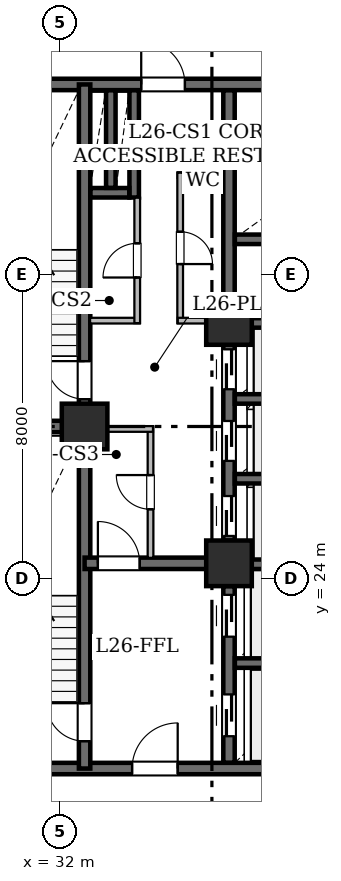
"""IFC4 building model, lengths in metres.
Left out: names, types, materials, properties, quantities, classifications, styles, units other than length and angle.
Written with IfcOpenShell. Run it as: python <this file> out.ifc"""

import sys

from ifc_helpers import new_model, si_unit, direction, frame, frame_2d, origin, origin_2d, place, context, subcontext, project, spatial, rectangle, hollow_rectangle, extrude, element, fill, save


model = new_model("IFC4")
c1 = context("Model", 3, precision=1e-05, world=origin(), true_north=direction((0.0, 1.0)))
c2 = subcontext(c1, "Body", "Model", "MODEL_VIEW")
j1 = project(units=[si_unit("LENGTHUNIT", "METRE"), si_unit("PLANEANGLEUNIT", "RADIAN")], contexts=[c1])
p1 = place(None, origin())
s1 = spatial("IfcSite", under=j1, at=p1, CompositionType="ELEMENT")
p2 = place(p1, origin())
s2 = spatial("IfcBuilding", under=s1, at=p2, CompositionType="ELEMENT")
p3 = place(p2, frame((0.0, 0.0, 105.55)))
s3 = spatial("IfcBuildingStorey", under=s2, at=p3, CompositionType="ELEMENT", Elevation=105.55)
for number, where, z_axis, x_axis in (
    (1, (32.65, 28.0, 0.0), (0.0, 0.0, 1.0), (1.0, 0.0, 0.0)),
    (2, (36.45, 24.4, 0.0), (0.0, 0.0, 1.0), (1.0, 0.0, 0.0)),
    (3, (36.45, 30.75, 0.0), (0.0, 0.0, 1.0), (1.0, 0.0, 0.0)),
):
    element("IfcColumn", number, at=place(p3, frame(where, z_axis=z_axis, x_axis=x_axis)), inside=s3, PredefinedType="COLUMN", context=c2, shape_type="SweptSolid", body=[
        extrude(hollow_rectangle(XDim=1.2, YDim=1.2, WallThickness=0.06, at=origin_2d()), origin(), (0.0, 0.0, 1.0), 3.65),
    ])
p4 = place(p3, frame((29.0, 19.0, 0.0), z_axis=(0.0, 0.0, 1.0), x_axis=(1.0, 0.0, 0.0)))
e4 = element("IfcWall", 4, at=p4, inside=s3, PredefinedType="SHEAR", context=c2, shape_type="SweptSolid", body=[
    extrude(rectangle(XDim=10.4, YDim=0.3, at=frame_2d((5.2, 0.0))), origin(), (0.0, 0.0, 1.0), 3.43),
])
p5 = place(p4, frame((4.9, 0.0, 0.0)))
e5 = element("IfcOpeningElement", 5, at=p5, cuts=e4, PredefinedType="OPENING", context=c2, shape_type="SweptSolid", body=[
    extrude(rectangle(XDim=1.2, YDim=2.15, at=frame_2d((0.6, 1.075))), frame((0.0, 0.16, 0.0), z_axis=(0.0, -1.0, 0.0), x_axis=(1.0, 0.0, 0.0)), (0.0, 0.0, 1.0), 0.32),
])
p6 = place(p3, frame((29.0, 37.0, 0.0), z_axis=(0.0, 0.0, 1.0), x_axis=(1.0, 0.0, 0.0)))
e6 = element("IfcWall", 6, at=p6, inside=s3, PredefinedType="SHEAR", context=c2, shape_type="SweptSolid", body=[
    extrude(rectangle(XDim=10.4, YDim=0.3, at=frame_2d((5.2, 0.0))), origin(), (0.0, 0.0, 1.0), 3.43),
])
p7 = place(p6, frame((5.14, 0.0, 0.0)))
e7 = element("IfcOpeningElement", 7, at=p7, cuts=e6, PredefinedType="OPENING", context=c2, shape_type="SweptSolid", body=[
    extrude(rectangle(XDim=1.15, YDim=2.2, at=frame_2d((0.575, 1.1))), frame((0.0, 0.16, 0.0), z_axis=(0.0, -1.0, 0.0), x_axis=(1.0, 0.0, 0.0)), (0.0, 0.0, 1.0), 0.32),
])
p8 = place(p3, frame((32.65, 19.0, 0.0), z_axis=(0.0, 0.0, 1.0), x_axis=(0.0, 1.0, 0.0)))
e8 = element("IfcWall", 8, at=p8, inside=s3, PredefinedType="SHEAR", context=c2, shape_type="SweptSolid", body=[
    extrude(rectangle(XDim=9.0, YDim=0.3, at=frame_2d((4.5, 0.0))), origin(), (0.0, 0.0, 1.0), 3.43),
])
p9 = place(p8, frame((0.72, 0.0, 0.0)))
e9 = element("IfcOpeningElement", 9, at=p9, cuts=e8, PredefinedType="OPENING", context=c2, shape_type="SweptSolid", body=[
    extrude(rectangle(XDim=1.0, YDim=2.15, at=frame_2d((0.5, 1.075))), frame((0.0, 0.16, 0.0), z_axis=(0.0, -1.0, 0.0), x_axis=(1.0, 0.0, 0.0)), (0.0, 0.0, 1.0), 0.32),
])
p10 = place(p3, frame((32.65, 28.0, 0.0), z_axis=(0.0, 0.0, 1.0), x_axis=(0.0, 1.0, 0.0)))
e10 = element("IfcWall", 10, at=p10, inside=s3, PredefinedType="SHEAR", context=c2, shape_type="SweptSolid", body=[
    extrude(rectangle(XDim=9.0, YDim=0.3, at=frame_2d((4.5, 0.0))), origin(), (0.0, 0.0, 1.0), 3.43),
])
p11 = place(p10, frame((0.72, 0.0, 0.0)))
e11 = element("IfcOpeningElement", 11, at=p11, cuts=e10, PredefinedType="OPENING", context=c2, shape_type="SweptSolid", body=[
    extrude(rectangle(XDim=1.0, YDim=2.15, at=frame_2d((0.5, 1.075))), frame((0.0, 0.16, 0.0), z_axis=(0.0, -1.0, 0.0), x_axis=(1.0, 0.0, 0.0)), (0.0, 0.0, 1.0), 0.32),
])
p12 = place(p3, frame((29.0, 28.0, 0.0), z_axis=(0.0, 0.0, 1.0), x_axis=(1.0, 0.0, 0.0)))
e12 = element("IfcWall", 12, at=p12, inside=s3, PredefinedType="SHEAR", context=c2, shape_type="SweptSolid", body=[
    extrude(rectangle(XDim=3.65, YDim=0.3, at=frame_2d((1.825, 0.0))), origin(), (0.0, 0.0, 1.0), 3.43),
])
p13 = place(p3, frame((32.65, 24.4, 0.0), z_axis=(0.0, 0.0, 1.0), x_axis=(1.0, 0.0, 0.0)))
e13 = element("IfcWall", 13, at=p13, inside=s3, PredefinedType="SHEAR", context=c2, shape_type="SweptSolid", body=[
    extrude(rectangle(XDim=3.8, YDim=0.3, at=frame_2d((1.9, 0.0))), origin(), (0.0, 0.0, 1.0), 3.43),
])
p14 = place(p13, frame((0.35, 0.0, 0.0)))
e14 = element("IfcOpeningElement", 14, at=p14, cuts=e13, PredefinedType="OPENING", context=c2, shape_type="SweptSolid", body=[
    extrude(rectangle(XDim=1.1, YDim=2.15, at=frame_2d((0.55, 1.075))), frame((0.0, 0.16, 0.0), z_axis=(0.0, -1.0, 0.0), x_axis=(1.0, 0.0, 0.0)), (0.0, 0.0, 1.0), 0.32),
])
p15 = place(p3, frame((36.45, 19.154, 0.0), z_axis=(0.0, 0.0, 1.0), x_axis=(0.0, 1.0, 0.0)))
e15 = element("IfcWall", 15, at=p15, inside=s3, PredefinedType="SHEAR", context=c2, shape_type="SweptSolid", body=[
    extrude(rectangle(XDim=4.646, YDim=0.3, at=frame_2d((2.323, 0.0))), origin(), (0.0, 0.0, 1.0), 3.43),
])
p16 = place(p15, frame((0.696, 0.0, 0.0)))
e16 = element("IfcOpeningElement", 16, at=p16, cuts=e15, PredefinedType="OPENING", context=c2, shape_type="SweptSolid", body=[
    extrude(rectangle(XDim=1.1, YDim=2.15, at=frame_2d((0.55, 1.075))), frame((0.0, 0.16, 0.0), z_axis=(0.0, -1.0, 0.0), x_axis=(1.0, 0.0, 0.0)), (0.0, 0.0, 1.0), 0.32),
])
p17 = place(p15, frame((3.316, 0.0, 0.0)))
e17 = element("IfcOpeningElement", 17, at=p17, cuts=e15, PredefinedType="OPENING", context=c2, shape_type="SweptSolid", body=[
    extrude(rectangle(XDim=1.1, YDim=2.15, at=frame_2d((0.55, 1.075))), frame((0.0, 0.16, 0.0), z_axis=(0.0, -1.0, 0.0), x_axis=(1.0, 0.0, 0.0)), (0.0, 0.0, 1.0), 0.32),
])
p18 = place(p3, frame((36.45, 25.0, 0.0), z_axis=(0.0, 0.0, 1.0), x_axis=(0.0, 1.0, 0.0)))
e18 = element("IfcWall", 18, at=p18, inside=s3, PredefinedType="SHEAR", context=c2, shape_type="SweptSolid", body=[
    extrude(rectangle(XDim=5.15, YDim=0.3, at=frame_2d((2.575, 0.0))), origin(), (0.0, 0.0, 1.0), 3.43),
])
p19 = place(p18, frame((0.12, 0.0, 0.0)))
e19 = element("IfcOpeningElement", 19, at=p19, cuts=e18, PredefinedType="OPENING", context=c2, shape_type="SweptSolid", body=[
    extrude(rectangle(XDim=1.05, YDim=2.15, at=frame_2d((0.525, 1.075))), frame((0.0, 0.16, 0.0), z_axis=(0.0, -1.0, 0.0), x_axis=(1.0, 0.0, 0.0)), (0.0, 0.0, 1.0), 0.32),
])
p20 = place(p18, frame((2.095, 0.0, 0.0)))
e20 = element("IfcOpeningElement", 20, at=p20, cuts=e18, PredefinedType="OPENING", context=c2, shape_type="SweptSolid", body=[
    extrude(rectangle(XDim=1.05, YDim=2.15, at=frame_2d((0.525, 1.075))), frame((0.0, 0.16, 0.0), z_axis=(0.0, -1.0, 0.0), x_axis=(1.0, 0.0, 0.0)), (0.0, 0.0, 1.0), 0.32),
])
p21 = place(p18, frame((3.98, 0.0, 0.0)))
e21 = element("IfcOpeningElement", 21, at=p21, cuts=e18, PredefinedType="OPENING", context=c2, shape_type="SweptSolid", body=[
    extrude(rectangle(XDim=1.05, YDim=2.15, at=frame_2d((0.525, 1.075))), frame((0.0, 0.16, 0.0), z_axis=(0.0, -1.0, 0.0), x_axis=(1.0, 0.0, 0.0)), (0.0, 0.0, 1.0), 0.32),
])
p22 = place(p3, frame((36.45, 31.35, 0.0), z_axis=(0.0, 0.0, 1.0), x_axis=(0.0, 1.0, 0.0)))
e22 = element("IfcWall", 22, at=p22, inside=s3, PredefinedType="SHEAR", context=c2, shape_type="SweptSolid", body=[
    extrude(rectangle(XDim=5.496, YDim=0.3, at=frame_2d((2.748, 0.0))), origin(), (0.0, 0.0, 1.0), 3.43),
])
for number, where, z_axis, x_axis in (
    (23, (36.604, 21.775, 0.0), (0.0, 0.0, 1.0), (1.0, 0.0, 0.0)),
    (24, (36.604, 24.375, 0.0), (0.0, 0.0, 1.0), (1.0, 0.0, 0.0)),
    (25, (36.604, 26.625, 0.0), (0.0, 0.0, 1.0), (1.0, 0.0, 0.0)),
    (26, (36.604, 28.725, 0.0), (0.0, 0.0, 1.0), (1.0, 0.0, 0.0)),
    (27, (36.604, 30.725, 0.0), (0.0, 0.0, 1.0), (1.0, 0.0, 0.0)),
    (28, (36.604, 32.925, 0.0), (0.0, 0.0, 1.0), (1.0, 0.0, 0.0)),
    (29, (36.604, 34.975, 0.0), (0.0, 0.0, 1.0), (1.0, 0.0, 0.0)),
):
    element("IfcWall", number, at=place(p3, frame(where, z_axis=z_axis, x_axis=x_axis)), inside=s3, PredefinedType="SHEAR", context=c2, shape_type="SweptSolid", body=[
        extrude(rectangle(XDim=2.642, YDim=0.25, at=frame_2d((1.321, 0.0))), origin(), (0.0, 0.0, 1.0), 3.43),
    ])
p23 = place(p3, frame((33.955, 34.025, 0.0), z_axis=(0.0, 0.0, 1.0), x_axis=(0.0, 1.0, 0.0)))
e30 = element("IfcWall", 30, at=p23, inside=s3, PredefinedType="SHEAR", context=c2, shape_type="SweptSolid", body=[
    extrude(rectangle(XDim=2.821, YDim=0.25, at=frame_2d((1.411, 0.0))), origin(), (0.0, 0.0, 1.0), 3.43),
])
p24 = place(p3, frame((32.804, 34.15, 0.0), z_axis=(0.0, 0.0, 1.0), x_axis=(1.0, 0.0, 0.0)))
e31 = element("IfcWall", 31, at=p24, inside=s3, PredefinedType="SHEAR", context=c2, shape_type="SweptSolid", body=[
    extrude(rectangle(XDim=1.022, YDim=0.25, at=frame_2d((0.511, 0.0))), origin(), (0.0, 0.0, 1.0), 3.43),
])
p25 = place(p3, frame((33.34, 34.279, 0.0), z_axis=(0.0, 0.0, 1.0), x_axis=(0.0, 1.0, 0.0)))
e32 = element("IfcWall", 32, at=p25, inside=s3, PredefinedType="SHEAR", context=c2, shape_type="SweptSolid", body=[
    extrude(rectangle(XDim=2.567, YDim=0.25, at=frame_2d((1.283, 0.0))), origin(), (0.0, 0.0, 1.0), 3.43),
])
p26 = place(p3, frame((36.306, 34.615, 0.0), z_axis=(0.0, 0.0, 1.0), x_axis=(-1.0, 0.0, 0.0)))
e33 = element("IfcWall", 33, at=p26, inside=s3, PredefinedType="STANDARD", context=c2, shape_type="SweptSolid", body=[
    extrude(rectangle(XDim=1.206, YDim=0.15, at=frame_2d((0.603, 0.0))), origin(), (0.0, 0.0, 1.0), 3.43),
])
p27 = place(p3, frame((35.165, 34.678, 0.0), z_axis=(0.0, 0.0, 1.0), x_axis=(0.0, -1.0, 0.0)))
e34 = element("IfcWall", 34, at=p27, inside=s3, PredefinedType="STANDARD", context=c2, shape_type="SweptSolid", body=[
    extrude(rectangle(XDim=3.958, YDim=0.15, at=frame_2d((1.979, 0.0))), origin(), (0.0, 0.0, 1.0), 3.43),
])
p28 = place(p27, frame((1.554, 0.0, 0.0)))
e35 = element("IfcOpeningElement", 35, at=p28, cuts=e34, PredefinedType="OPENING", context=c2, shape_type="SweptSolid", body=[
    extrude(rectangle(XDim=0.85, YDim=2.1, at=frame_2d((0.425, 1.05))), frame((0.0, 0.085, 0.0), z_axis=(0.0, -1.0, 0.0), x_axis=(1.0, 0.0, 0.0)), (0.0, 0.0, 1.0), 0.17),
])
p29 = place(p3, frame((35.102, 30.785, 0.0), z_axis=(0.0, 0.0, 1.0), x_axis=(1.0, 0.0, 0.0)))
e36 = element("IfcWall", 36, at=p29, inside=s3, PredefinedType="STANDARD", context=c2, shape_type="SweptSolid", body=[
    extrude(rectangle(XDim=1.198, YDim=0.15, at=frame_2d((0.599, 0.0))), origin(), (0.0, 0.0, 1.0), 3.43),
])
p30 = place(p3, frame((32.794, 30.785, 0.0), z_axis=(0.0, 0.0, 1.0), x_axis=(1.0, 0.0, 0.0)))
e37 = element("IfcWall", 37, at=p30, inside=s3, PredefinedType="STANDARD", context=c2, shape_type="SweptSolid", body=[
    extrude(rectangle(XDim=1.306, YDim=0.15, at=frame_2d((0.653, 0.0))), origin(), (0.0, 0.0, 1.0), 2.887),
])
p31 = place(p3, frame((34.035, 30.72, 0.0), z_axis=(0.0, 0.0, 1.0), x_axis=(0.0, 1.0, 0.0)))
e38 = element("IfcWall", 38, at=p31, inside=s3, PredefinedType="STANDARD", context=c2, shape_type="SweptSolid", body=[
    extrude(rectangle(XDim=3.3, YDim=0.15, at=frame_2d((1.65, 0.0))), origin(), (0.0, 0.0, 1.0), 3.43),
])
p32 = place(p31, frame((1.2, 0.0, 0.0)))
e39 = element("IfcOpeningElement", 39, at=p32, cuts=e38, PredefinedType="OPENING", context=c2, shape_type="SweptSolid", body=[
    extrude(rectangle(XDim=0.9, YDim=2.1, at=frame_2d((0.45, 1.05))), frame((0.0, 0.085, 0.0), z_axis=(0.0, -1.0, 0.0), x_axis=(1.0, 0.0, 0.0)), (0.0, 0.0, 1.0), 0.17),
])
p33 = place(p3, frame((34.385, 24.544, 0.0), z_axis=(0.0, 0.0, 1.0), x_axis=(0.0, 1.0, 0.0)))
e40 = element("IfcWall", 40, at=p33, inside=s3, PredefinedType="STANDARD", context=c2, shape_type="SweptSolid", body=[
    extrude(rectangle(XDim=3.456, YDim=0.15, at=frame_2d((1.728, 0.0))), origin(), (0.0, 0.0, 1.0), 3.43),
])
p34 = place(p33, frame((1.278, 0.0, 0.0)))
e41 = element("IfcOpeningElement", 41, at=p34, cuts=e40, PredefinedType="OPENING", context=c2, shape_type="SweptSolid", body=[
    extrude(rectangle(XDim=0.9, YDim=2.1, at=frame_2d((0.45, 1.05))), frame((0.0, 0.085, 0.0), z_axis=(0.0, -1.0, 0.0), x_axis=(1.0, 0.0, 0.0)), (0.0, 0.0, 1.0), 0.17),
])
p35 = place(p3, frame((34.45, 27.935, 0.0), z_axis=(0.0, 0.0, 1.0), x_axis=(-1.0, 0.0, 0.0)))
e42 = element("IfcWall", 42, at=p35, inside=s3, PredefinedType="STANDARD", context=c2, shape_type="SweptSolid", body=[
    extrude(rectangle(XDim=1.656, YDim=0.15, at=frame_2d((0.828, 0.0))), origin(), (0.0, 0.0, 1.0), 2.887),
])
p36 = place(p9, origin())
e43 = element("IfcDoor", 43, at=p36, inside=s3, OperationType="SINGLE_SWING_RIGHT", PredefinedType="DOOR", context=c2, shape_type="SweptSolid", body=[
    extrude(rectangle(XDim=1.0, YDim=2.15, at=frame_2d((0.5, 1.075))), frame((0.0, 0.025, 0.0), z_axis=(0.0, -1.0, 0.0), x_axis=(1.0, 0.0, 0.0)), (0.0, 0.0, 1.0), 0.05),
])
fill(e9, e43)
p37 = place(p11, origin())
e44 = element("IfcDoor", 44, at=p37, inside=s3, OperationType="SINGLE_SWING_RIGHT", PredefinedType="DOOR", context=c2, shape_type="SweptSolid", body=[
    extrude(rectangle(XDim=1.0, YDim=2.15, at=frame_2d((0.5, 1.075))), frame((0.0, 0.025, 0.0), z_axis=(0.0, -1.0, 0.0), x_axis=(1.0, 0.0, 0.0)), (0.0, 0.0, 1.0), 0.05),
])
fill(e11, e44)
p38 = place(p14, origin())
e45 = element("IfcDoor", 45, at=p38, inside=s3, OperationType="SINGLE_SWING_LEFT", PredefinedType="DOOR", context=c2, shape_type="SweptSolid", body=[
    extrude(rectangle(XDim=1.1, YDim=2.15, at=frame_2d((0.55, 1.075))), frame((0.0, 0.025, 0.0), z_axis=(0.0, -1.0, 0.0), x_axis=(1.0, 0.0, 0.0)), (0.0, 0.0, 1.0), 0.05),
])
fill(e14, e45)
p39 = place(p5, origin())
e46 = element("IfcDoor", 46, at=p39, inside=s3, OperationType="SINGLE_SWING_RIGHT", PredefinedType="DOOR", context=c2, shape_type="SweptSolid", body=[
    extrude(rectangle(XDim=1.2, YDim=2.15, at=frame_2d((0.6, 1.075))), frame((0.0, 0.025, 0.0), z_axis=(0.0, -1.0, 0.0), x_axis=(1.0, 0.0, 0.0)), (0.0, 0.0, 1.0), 0.05),
])
fill(e5, e46)
p40 = place(p7, origin())
e47 = element("IfcDoor", 47, at=p40, inside=s3, OperationType="SINGLE_SWING_LEFT", PredefinedType="DOOR", context=c2, shape_type="SweptSolid", body=[
    extrude(rectangle(XDim=1.15, YDim=2.2, at=frame_2d((0.575, 1.1))), frame((0.0, 0.025, 0.0), z_axis=(0.0, -1.0, 0.0), x_axis=(1.0, 0.0, 0.0)), (0.0, 0.0, 1.0), 0.05),
])
fill(e7, e47)
p41 = place(p16, origin())
e48 = element("IfcDoor", 48, at=p41, inside=s3, OperationType="SLIDING_TO_LEFT", PredefinedType="DOOR", context=c2, shape_type="SweptSolid", body=[
    extrude(rectangle(XDim=1.1, YDim=2.15, at=frame_2d((0.55, 1.075))), frame((0.0, 0.025, 0.0), z_axis=(0.0, -1.0, 0.0), x_axis=(1.0, 0.0, 0.0)), (0.0, 0.0, 1.0), 0.05),
])
fill(e16, e48)
p42 = place(p17, origin())
e49 = element("IfcDoor", 49, at=p42, inside=s3, OperationType="SLIDING_TO_LEFT", PredefinedType="DOOR", context=c2, shape_type="SweptSolid", body=[
    extrude(rectangle(XDim=1.1, YDim=2.15, at=frame_2d((0.55, 1.075))), frame((0.0, 0.025, 0.0), z_axis=(0.0, -1.0, 0.0), x_axis=(1.0, 0.0, 0.0)), (0.0, 0.0, 1.0), 0.05),
])
fill(e17, e49)
p43 = place(p19, origin())
e50 = element("IfcDoor", 50, at=p43, inside=s3, OperationType="SLIDING_TO_LEFT", PredefinedType="DOOR", context=c2, shape_type="SweptSolid", body=[
    extrude(rectangle(XDim=1.05, YDim=2.15, at=frame_2d((0.525, 1.075))), frame((0.0, 0.025, 0.0), z_axis=(0.0, -1.0, 0.0), x_axis=(1.0, 0.0, 0.0)), (0.0, 0.0, 1.0), 0.05),
])
fill(e19, e50)
p44 = place(p20, origin())
e51 = element("IfcDoor", 51, at=p44, inside=s3, OperationType="SLIDING_TO_LEFT", PredefinedType="DOOR", context=c2, shape_type="SweptSolid", body=[
    extrude(rectangle(XDim=1.05, YDim=2.15, at=frame_2d((0.525, 1.075))), frame((0.0, 0.025, 0.0), z_axis=(0.0, -1.0, 0.0), x_axis=(1.0, 0.0, 0.0)), (0.0, 0.0, 1.0), 0.05),
])
fill(e20, e51)
p45 = place(p21, origin())
e52 = element("IfcDoor", 52, at=p45, inside=s3, OperationType="SLIDING_TO_LEFT", PredefinedType="DOOR", context=c2, shape_type="SweptSolid", body=[
    extrude(rectangle(XDim=1.05, YDim=2.15, at=frame_2d((0.525, 1.075))), frame((0.0, 0.025, 0.0), z_axis=(0.0, -1.0, 0.0), x_axis=(1.0, 0.0, 0.0)), (0.0, 0.0, 1.0), 0.05),
])
fill(e21, e52)
p46 = place(p28, origin())
e53 = element("IfcDoor", 53, at=p46, inside=s3, OperationType="SINGLE_SWING_RIGHT", PredefinedType="DOOR", context=c2, shape_type="SweptSolid", body=[
    extrude(rectangle(XDim=0.85, YDim=2.1, at=frame_2d((0.425, 1.05))), frame((0.0, 0.025, 0.0), z_axis=(0.0, -1.0, 0.0), x_axis=(1.0, 0.0, 0.0)), (0.0, 0.0, 1.0), 0.05),
])
fill(e35, e53)
p47 = place(p32, origin())
e54 = element("IfcDoor", 54, at=p47, inside=s3, OperationType="SINGLE_SWING_LEFT", PredefinedType="DOOR", context=c2, shape_type="SweptSolid", body=[
    extrude(rectangle(XDim=0.9, YDim=2.1, at=frame_2d((0.45, 1.05))), frame((0.0, 0.025, 0.0), z_axis=(0.0, -1.0, 0.0), x_axis=(1.0, 0.0, 0.0)), (0.0, 0.0, 1.0), 0.05),
])
fill(e39, e54)
p48 = place(p34, origin())
e55 = element("IfcDoor", 55, at=p48, inside=s3, OperationType="SINGLE_SWING_RIGHT", PredefinedType="DOOR", context=c2, shape_type="SweptSolid", body=[
    extrude(rectangle(XDim=0.9, YDim=2.1, at=frame_2d((0.45, 1.05))), frame((0.0, 0.025, 0.0), z_axis=(0.0, -1.0, 0.0), x_axis=(1.0, 0.0, 0.0)), (0.0, 0.0, 1.0), 0.05),
])
fill(e41, e55)
save(model, sys.argv[1])
